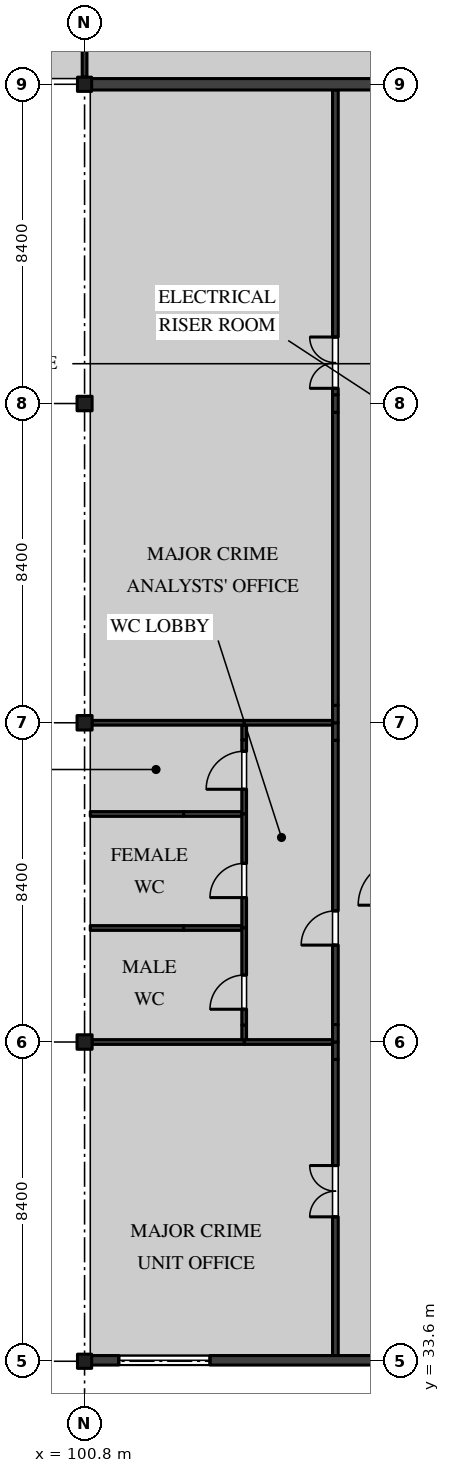
"""IFC4 building model, lengths in metres.
Left out: names, types, materials, properties, quantities, classifications, styles, units other than length and angle.
Written with IfcOpenShell. Run it as: python <this file> out.ifc"""

import sys

from ifc_helpers import new_model, si_unit, direction, frame, frame_2d, origin, origin_2d, place, context, subcontext, project, spatial, rectangle, i_section, extrude, element, fill, save


model = new_model("IFC4")
c1 = context("Model", 3, precision=1e-05, world=origin(), true_north=direction((0.0, 1.0)))
c2 = subcontext(c1, "Body", "Model", "MODEL_VIEW")
j1 = project(units=[si_unit("LENGTHUNIT", "METRE"), si_unit("PLANEANGLEUNIT", "RADIAN")], contexts=[c1])
p1 = place(None, origin())
s1 = spatial("IfcSite", under=j1, at=p1, CompositionType="ELEMENT")
p2 = place(p1, origin())
s2 = spatial("IfcBuilding", under=s1, at=p2, CompositionType="ELEMENT")
p3 = place(p2, frame((0.0, 0.0, 14.4)))
s3 = spatial("IfcBuildingStorey", under=s2, at=p3, CompositionType="ELEMENT", Elevation=14.4)
p4 = place(p3, frame((100.8, 33.6, 0.0), z_axis=(0.0, 0.0, 1.0), x_axis=(1.0, 0.0, 0.0)))
e1 = element("IfcColumn", 1, at=p4, inside=s3, PredefinedType="COLUMN", context=c2, shape_type="SweptSolid", body=[
    extrude(i_section(OverallWidth=0.373, OverallDepth=0.373, WebThickness=0.016, FlangeThickness=0.026, FilletRadius=0.015, at=origin_2d()), origin(), (0.0, 0.0, 1.0), 4.37),
])
for number, where, z_axis, x_axis in (
    (2, (100.8, 42.0, 0.0), (0.0, 0.0, 1.0), (1.0, 0.0, 0.0)),
    (3, (100.8, 50.4, 0.0), (0.0, 0.0, 1.0), (1.0, 0.0, 0.0)),
    (4, (100.8, 58.8, 0.0), (0.0, 0.0, 1.0), (1.0, 0.0, 0.0)),
):
    element("IfcColumn", number, at=place(p3, frame(where, z_axis=z_axis, x_axis=x_axis)), inside=s3, PredefinedType="COLUMN", context=c2, shape_type="SweptSolid", body=[
        extrude(i_section(OverallWidth=0.396, OverallDepth=0.381, WebThickness=0.019, FlangeThickness=0.03, FilletRadius=0.015, at=origin_2d()), origin(), (0.0, 0.0, 1.0), 4.37),
    ])
p5 = place(p3, frame((100.8, 67.2, 0.0), z_axis=(0.0, 0.0, 1.0), x_axis=(1.0, 0.0, 0.0)))
e5 = element("IfcColumn", 5, at=p5, inside=s3, PredefinedType="COLUMN", context=c2, shape_type="SweptSolid", body=[
    extrude(i_section(OverallWidth=0.373, OverallDepth=0.373, WebThickness=0.016, FlangeThickness=0.026, FilletRadius=0.015, at=origin_2d()), origin(), (0.0, 0.0, 1.0), 4.37),
])
p6 = place(p3, frame((107.4, 33.75, 0.0), z_axis=(0.0, 0.0, 1.0), x_axis=(0.0, 1.0, 0.0)))
e6 = element("IfcWall", 6, at=p6, inside=s3, PredefinedType="PARTITIONING", context=c2, shape_type="SweptSolid", body=[
    extrude(rectangle(XDim=7.79, YDim=0.15, at=frame_2d((3.895, 0.0))), origin(), (0.0, 0.0, 1.0), 4.37),
])
p7 = place(p6, frame((3.65, 0.0, 0.0)))
e7 = element("IfcOpeningElement", 7, at=p7, cuts=e6, PredefinedType="OPENING", context=c2, shape_type="SweptSolid", body=[
    extrude(rectangle(XDim=1.35, YDim=2.1, at=frame_2d((0.675, 1.05))), frame((0.0, 0.085, 0.0), z_axis=(0.0, -1.0, 0.0), x_axis=(1.0, 0.0, 0.0)), (0.0, 0.0, 1.0), 0.17),
])
for number, where, z_axis, x_axis in (
    (8, (107.4, 41.54, 0.0), (0.0, 0.0, 1.0), (0.0, 1.0, 0.0)),
    (9, (107.4, 42.0, 0.0), (0.0, 0.0, 1.0), (0.0, 1.0, 0.0)),
):
    element("IfcWall", number, at=place(p3, frame(where, z_axis=z_axis, x_axis=x_axis)), inside=s3, PredefinedType="PARTITIONING", context=c2, shape_type="SweptSolid", body=[
        extrude(rectangle(XDim=0.46, YDim=0.15, at=frame_2d((0.23, 0.0))), origin(), (0.0, 0.0, 1.0), 3.746),
    ])
p8 = place(p3, frame((107.4, 42.46, 0.0), z_axis=(0.0, 0.0, 1.0), x_axis=(0.0, 1.0, 0.0)))
e10 = element("IfcWall", 10, at=p8, inside=s3, PredefinedType="PARTITIONING", context=c2, shape_type="SweptSolid", body=[
    extrude(rectangle(XDim=7.48, YDim=0.15, at=frame_2d((3.74, 0.0))), origin(), (0.0, 0.0, 1.0), 4.37),
])
p9 = place(p8, frame((2.09, 0.0, 0.0)))
e11 = element("IfcOpeningElement", 11, at=p9, cuts=e10, PredefinedType="OPENING", context=c2, shape_type="SweptSolid", body=[
    extrude(rectangle(XDim=0.9, YDim=2.1, at=frame_2d((0.45, 1.05))), frame((0.0, 0.085, 0.0), z_axis=(0.0, -1.0, 0.0), x_axis=(1.0, 0.0, 0.0)), (0.0, 0.0, 1.0), 0.17),
])
p10 = place(p3, frame((107.4, 49.94, 0.0), z_axis=(0.0, 0.0, 1.0), x_axis=(0.0, 1.0, 0.0)))
e12 = element("IfcWall", 12, at=p10, inside=s3, PredefinedType="PARTITIONING", context=c2, shape_type="SweptSolid", body=[
    extrude(rectangle(XDim=0.46, YDim=0.15, at=frame_2d((0.23, 0.0))), origin(), (0.0, 0.0, 1.0), 3.746),
])
p11 = place(p3, frame((107.4, 50.4, 0.0), z_axis=(0.0, 0.0, 1.0), x_axis=(0.0, 1.0, 0.0)))
e13 = element("IfcWall", 13, at=p11, inside=s3, PredefinedType="PARTITIONING", context=c2, shape_type="SweptSolid", body=[
    extrude(rectangle(XDim=0.46, YDim=0.15, at=frame_2d((0.23, 0.0))), origin(), (0.0, 0.0, 1.0), 3.746),
])
p12 = place(p3, frame((107.4, 50.86, 0.0), z_axis=(0.0, 0.0, 1.0), x_axis=(0.0, 1.0, 0.0)))
e14 = element("IfcWall", 14, at=p12, inside=s3, PredefinedType="PARTITIONING", context=c2, shape_type="SweptSolid", body=[
    extrude(rectangle(XDim=7.71, YDim=0.15, at=frame_2d((3.855, 0.0))), origin(), (0.0, 0.0, 1.0), 4.37),
])
p13 = place(p3, frame((107.4, 58.57, 0.0), z_axis=(0.0, 0.0, 1.0), x_axis=(0.0, 1.0, 0.0)))
e15 = element("IfcWall", 15, at=p13, inside=s3, PredefinedType="PARTITIONING", context=c2, shape_type="SweptSolid", body=[
    extrude(rectangle(XDim=0.46, YDim=0.15, at=frame_2d((0.23, 0.0))), origin(), (0.0, 0.0, 1.0), 3.746),
])
p14 = place(p3, frame((107.4, 59.03, 0.0), z_axis=(0.0, 0.0, 1.0), x_axis=(0.0, 1.0, 0.0)))
e16 = element("IfcWall", 16, at=p14, inside=s3, PredefinedType="PARTITIONING", context=c2, shape_type="SweptSolid", body=[
    extrude(rectangle(XDim=8.02, YDim=0.15, at=frame_2d((4.01, 0.0))), origin(), (0.0, 0.0, 1.0), 4.37),
])
p15 = place(p14, frame((0.17, 0.0, 0.0)))
e17 = element("IfcOpeningElement", 17, at=p15, cuts=e16, PredefinedType="OPENING", context=c2, shape_type="SweptSolid", body=[
    extrude(rectangle(XDim=1.35, YDim=2.1, at=frame_2d((0.675, 1.05))), frame((0.0, 0.085, 0.0), z_axis=(0.0, -1.0, 0.0), x_axis=(1.0, 0.0, 0.0)), (0.0, 0.0, 1.0), 0.17),
])
p16 = place(p3, frame((105.0, 42.0, 0.0), z_axis=(0.0, 0.0, 1.0), x_axis=(1.0, 0.0, 0.0)))
e18 = element("IfcWall", 18, at=p16, inside=s3, PredefinedType="PARTITIONING", context=c2, shape_type="SweptSolid", body=[
    extrude(rectangle(XDim=2.325, YDim=0.125, at=frame_2d((1.163, 0.0))), origin(), (0.0, 0.0, 1.0), 3.746),
])
p17 = place(p3, frame((100.998, 42.0, 0.0), z_axis=(0.0, 0.0, 1.0), x_axis=(1.0, 0.0, 0.0)))
e19 = element("IfcWall", 19, at=p17, inside=s3, PredefinedType="PARTITIONING", context=c2, shape_type="SweptSolid", body=[
    extrude(rectangle(XDim=4.002, YDim=0.125, at=frame_2d((2.001, 0.0))), origin(), (0.0, 0.0, 1.0), 3.746),
])
p18 = place(p3, frame((100.95, 48.0, 0.0), z_axis=(0.0, 0.0, 1.0), x_axis=(1.0, 0.0, 0.0)))
e20 = element("IfcWall", 20, at=p18, inside=s3, PredefinedType="PARTITIONING", context=c2, shape_type="SweptSolid", body=[
    extrude(rectangle(XDim=2.457, YDim=0.125, at=frame_2d((1.229, 0.0))), origin(), (0.0, 0.0, 1.0), 4.37),
])
p19 = place(p3, frame((103.407, 48.0, 0.0), z_axis=(0.0, 0.0, 1.0), x_axis=(1.0, 0.0, 0.0)))
e21 = element("IfcWall", 21, at=p19, inside=s3, PredefinedType="PARTITIONING", context=c2, shape_type="SweptSolid", body=[
    extrude(rectangle(XDim=1.531, YDim=0.125, at=frame_2d((0.766, 0.0))), origin(), (0.0, 0.0, 1.0), 3.895),
])
p20 = place(p3, frame((105.0, 48.0, 0.0), z_axis=(0.0, 0.0, 1.0), x_axis=(0.0, 1.0, 0.0)))
e22 = element("IfcWall", 22, at=p20, inside=s3, PredefinedType="PARTITIONING", context=c2, shape_type="SweptSolid", body=[
    extrude(rectangle(XDim=1.952, YDim=0.125, at=frame_2d((0.976, 0.0))), origin(), (0.0, 0.0, 1.0), 4.37),
])
p21 = place(p20, frame((0.65, 0.0, 0.0)))
e23 = element("IfcOpeningElement", 23, at=p21, cuts=e22, PredefinedType="OPENING", context=c2, shape_type="SweptSolid", body=[
    extrude(rectangle(XDim=1.0, YDim=2.1, at=frame_2d((0.5, 1.05))), frame((0.0, 0.073, 0.0), z_axis=(0.0, -1.0, 0.0), x_axis=(1.0, 0.0, 0.0)), (0.0, 0.0, 1.0), 0.145),
])
p22 = place(p3, frame((105.0, 49.952, 0.0), z_axis=(0.0, 0.0, 1.0), x_axis=(0.0, 1.0, 0.0)))
e24 = element("IfcWall", 24, at=p22, inside=s3, PredefinedType="PARTITIONING", context=c2, shape_type="SweptSolid", body=[
    extrude(rectangle(XDim=0.385, YDim=0.125, at=frame_2d((0.192, 0.0))), origin(), (0.0, 0.0, 1.0), 3.746),
])
p23 = place(p3, frame((100.998, 50.4, 0.0), z_axis=(0.0, 0.0, 1.0), x_axis=(1.0, 0.0, 0.0)))
e25 = element("IfcWall", 25, at=p23, inside=s3, PredefinedType="PARTITIONING", context=c2, shape_type="SweptSolid", body=[
    extrude(rectangle(XDim=4.002, YDim=0.125, at=frame_2d((2.001, 0.0))), origin(), (0.0, 0.0, 1.0), 3.746),
])
p24 = place(p3, frame((105.0, 45.0, 0.0), z_axis=(0.0, 0.0, 1.0), x_axis=(0.0, 1.0, 0.0)))
e26 = element("IfcWall", 26, at=p24, inside=s3, PredefinedType="PARTITIONING", context=c2, shape_type="SweptSolid", body=[
    extrude(rectangle(XDim=3.0, YDim=0.125, at=frame_2d((1.5, 0.0))), origin(), (0.0, 0.0, 1.0), 4.37),
])
p25 = place(p24, frame((0.8, 0.0, 0.0)))
e27 = element("IfcOpeningElement", 27, at=p25, cuts=e26, PredefinedType="OPENING", context=c2, shape_type="SweptSolid", body=[
    extrude(rectangle(XDim=0.9, YDim=2.1, at=frame_2d((0.45, 1.05))), frame((0.0, 0.073, 0.0), z_axis=(0.0, -1.0, 0.0), x_axis=(1.0, 0.0, 0.0)), (0.0, 0.0, 1.0), 0.145),
])
p26 = place(p3, frame((100.95, 45.0, 0.0), z_axis=(0.0, 0.0, 1.0), x_axis=(1.0, 0.0, 0.0)))
e28 = element("IfcWall", 28, at=p26, inside=s3, PredefinedType="PARTITIONING", context=c2, shape_type="SweptSolid", body=[
    extrude(rectangle(XDim=2.457, YDim=0.125, at=frame_2d((1.229, 0.0))), origin(), (0.0, 0.0, 1.0), 4.37),
])
p27 = place(p3, frame((103.407, 45.0, 0.0), z_axis=(0.0, 0.0, 1.0), x_axis=(1.0, 0.0, 0.0)))
e29 = element("IfcWall", 29, at=p27, inside=s3, PredefinedType="PARTITIONING", context=c2, shape_type="SweptSolid", body=[
    extrude(rectangle(XDim=1.531, YDim=0.125, at=frame_2d((0.766, 0.0))), origin(), (0.0, 0.0, 1.0), 3.895),
])
p28 = place(p3, frame((105.0, 42.062, 0.0), z_axis=(0.0, 0.0, 1.0), x_axis=(0.0, 1.0, 0.0)))
e30 = element("IfcWall", 30, at=p28, inside=s3, PredefinedType="PARTITIONING", context=c2, shape_type="SweptSolid", body=[
    extrude(rectangle(XDim=0.385, YDim=0.125, at=frame_2d((0.192, 0.0))), origin(), (0.0, 0.0, 1.0), 3.746),
])
p29 = place(p3, frame((105.0, 42.447, 0.0), z_axis=(0.0, 0.0, 1.0), x_axis=(0.0, 1.0, 0.0)))
e31 = element("IfcWall", 31, at=p29, inside=s3, PredefinedType="PARTITIONING", context=c2, shape_type="SweptSolid", body=[
    extrude(rectangle(XDim=2.553, YDim=0.125, at=frame_2d((1.276, 0.0))), origin(), (0.0, 0.0, 1.0), 4.37),
])
p30 = place(p29, frame((0.415, 0.0, 0.0)))
e32 = element("IfcOpeningElement", 32, at=p30, cuts=e31, PredefinedType="OPENING", context=c2, shape_type="SweptSolid", body=[
    extrude(rectangle(XDim=0.9, YDim=2.1, at=frame_2d((0.45, 1.05))), frame((0.0, 0.073, 0.0), z_axis=(0.0, -1.0, 0.0), x_axis=(1.0, 0.0, 0.0)), (0.0, 0.0, 1.0), 0.145),
])
p31 = place(p3, frame((105.0, 50.4, 0.0), z_axis=(0.0, 0.0, 1.0), x_axis=(1.0, 0.0, 0.0)))
e33 = element("IfcWall", 33, at=p31, inside=s3, PredefinedType="PARTITIONING", context=c2, shape_type="SweptSolid", body=[
    extrude(rectangle(XDim=2.325, YDim=0.125, at=frame_2d((1.163, 0.0))), origin(), (0.0, 0.0, 1.0), 3.746),
])
p32 = place(p3, frame((100.8, 67.386, 0.0), z_axis=(0.0, 0.0, 1.0), x_axis=(0.0, 1.0, 0.0)))
e34 = element("IfcWall", 34, at=p32, inside=s3, PredefinedType="PARTITIONING", context=c2, shape_type="SweptSolid", body=[
    extrude(rectangle(XDim=6.639, YDim=0.125, at=frame_2d((3.319, 0.0))), origin(), (0.0, 0.0, 1.0), 3.746),
])
p33 = place(p3, frame((100.802, 33.625, 0.0), z_axis=(0.0, 0.0, 1.0), x_axis=(1.0, 0.0, 0.0)))
e35 = element("IfcWall", 35, at=p33, inside=s3, PredefinedType="SOLIDWALL", context=c2, shape_type="SweptSolid", body=[
    extrude(rectangle(XDim=8.198, YDim=0.25, at=frame_2d((4.099, 0.0))), origin(), (0.0, 0.0, 1.0), 3.746),
])
p34 = place(p33, frame((0.898, 0.0, 0.9)))
e36 = element("IfcOpeningElement", 36, at=p34, cuts=e35, PredefinedType="OPENING", context=c2, shape_type="SweptSolid", body=[
    extrude(rectangle(XDim=2.4, YDim=2.1, at=frame_2d((1.2, 1.05))), frame((0.0, 0.135, 0.0), z_axis=(0.0, -1.0, 0.0), x_axis=(1.0, 0.0, 0.0)), (0.0, 0.0, 1.0), 0.27),
])
p35 = place(p3, frame((109.0, 67.2, 0.0), z_axis=(0.0, 0.0, 1.0), x_axis=(-1.0, 0.0, 0.0)))
e37 = element("IfcWall", 37, at=p35, inside=s3, PredefinedType="SOLIDWALL", context=c2, shape_type="SweptSolid", body=[
    extrude(rectangle(XDim=8.198, YDim=0.3, at=frame_2d((4.099, 0.0))), origin(), (0.0, 0.0, 1.0), 3.746),
])
p36 = place(p7, origin())
e38 = element("IfcDoor", 38, at=p36, inside=s3, OperationType="DOUBLE_DOOR_SINGLE_SWING", PredefinedType="DOOR", context=c2, shape_type="SweptSolid", body=[
    extrude(rectangle(XDim=1.35, YDim=2.1, at=frame_2d((0.675, 1.05))), frame((0.0, 0.025, 0.0), z_axis=(0.0, -1.0, 0.0), x_axis=(1.0, 0.0, 0.0)), (0.0, 0.0, 1.0), 0.05),
])
fill(e7, e38)
p37 = place(p21, origin())
e39 = element("IfcDoor", 39, at=p37, inside=s3, OperationType="SINGLE_SWING_RIGHT", PredefinedType="DOOR", context=c2, shape_type="SweptSolid", body=[
    extrude(rectangle(XDim=1.0, YDim=2.1, at=frame_2d((0.5, 1.05))), frame((0.0, 0.02, 0.0), z_axis=(0.0, -1.0, 0.0), x_axis=(1.0, 0.0, 0.0)), (0.0, 0.0, 1.0), 0.04),
])
fill(e23, e39)
p38 = place(p25, origin())
e40 = element("IfcDoor", 40, at=p38, inside=s3, OperationType="SINGLE_SWING_RIGHT", PredefinedType="DOOR", context=c2, shape_type="SweptSolid", body=[
    extrude(rectangle(XDim=0.9, YDim=2.1, at=frame_2d((0.45, 1.05))), frame((0.0, 0.02, 0.0), z_axis=(0.0, -1.0, 0.0), x_axis=(1.0, 0.0, 0.0)), (0.0, 0.0, 1.0), 0.04),
])
fill(e27, e40)
p39 = place(p9, origin())
e41 = element("IfcDoor", 41, at=p39, inside=s3, OperationType="SINGLE_SWING_RIGHT", PredefinedType="DOOR", context=c2, shape_type="SweptSolid", body=[
    extrude(rectangle(XDim=0.9, YDim=2.1, at=frame_2d((0.45, 1.05))), frame((0.0, 0.025, 0.0), z_axis=(0.0, -1.0, 0.0), x_axis=(1.0, 0.0, 0.0)), (0.0, 0.0, 1.0), 0.05),
])
fill(e11, e41)
p40 = place(p30, origin())
e42 = element("IfcDoor", 42, at=p40, inside=s3, OperationType="SINGLE_SWING_RIGHT", PredefinedType="DOOR", context=c2, shape_type="SweptSolid", body=[
    extrude(rectangle(XDim=0.9, YDim=2.1, at=frame_2d((0.45, 1.05))), frame((0.0, 0.02, 0.0), z_axis=(0.0, -1.0, 0.0), x_axis=(1.0, 0.0, 0.0)), (0.0, 0.0, 1.0), 0.04),
])
fill(e32, e42)
p41 = place(p15, origin())
e43 = element("IfcDoor", 43, at=p41, inside=s3, OperationType="DOUBLE_DOOR_SINGLE_SWING", PredefinedType="DOOR", context=c2, shape_type="SweptSolid", body=[
    extrude(rectangle(XDim=1.35, YDim=2.1, at=frame_2d((0.675, 1.05))), frame((0.0, 0.025, 0.0), z_axis=(0.0, -1.0, 0.0), x_axis=(1.0, 0.0, 0.0)), (0.0, 0.0, 1.0), 0.05),
])
fill(e17, e43)
p42 = place(p34, origin())
e44 = element("IfcWindow", 44, at=p42, inside=s3, PartitioningType="SINGLE_PANEL", PredefinedType="WINDOW", context=c2, shape_type="SweptSolid", body=[
    extrude(rectangle(XDim=2.4, YDim=2.1, at=frame_2d((1.2, 1.05))), frame((0.0, 0.04, 0.0), z_axis=(0.0, -1.0, 0.0), x_axis=(1.0, 0.0, 0.0)), (0.0, 0.0, 1.0), 0.08),
])
fill(e36, e44)
save(model, sys.argv[1])
